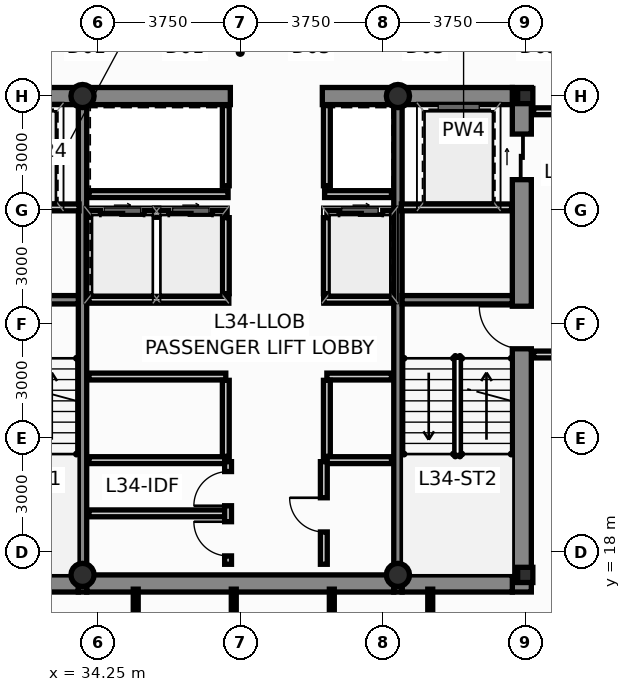
"""IFC4 building model, lengths in metres.
Left out: names, types, materials, properties, quantities, classifications, styles, units other than length and angle.
Written with IfcOpenShell. Run it as: python <this file> out.ifc"""

import sys

from ifc_helpers import new_model, si_unit, direction, frame, frame_2d, origin, origin_2d, place, context, subcontext, project, spatial, rectangle, hollow_circle, i_section, extrude, source, transform, mapped, element, fill, save


model = new_model("IFC4")
c1 = context("Model", 3, precision=1e-05, world=origin(), true_north=direction((0.0, 1.0)))
c2 = subcontext(c1, "Body", "Model", "MODEL_VIEW")
j1 = project(units=[si_unit("LENGTHUNIT", "METRE"), si_unit("PLANEANGLEUNIT", "RADIAN")], contexts=[c1])
p1 = place(None, origin())
s1 = spatial("IfcSite", under=j1, at=p1, CompositionType="ELEMENT")
p2 = place(p1, origin())
s2 = spatial("IfcBuilding", under=s1, at=p2, CompositionType="ELEMENT")
p3 = place(p2, frame((0.0, 0.0, 131.8)))
s3 = spatial("IfcBuildingStorey", under=s2, at=p3, CompositionType="ELEMENT", Elevation=131.8)
m1 = source(origin(), c2, "Body", "SweptSolid", [
    extrude(i_section(OverallWidth=0.4, OverallDepth=0.4, WebThickness=0.02, FlangeThickness=0.032, at=origin_2d()), origin(), (0.0, 0.0, 1.0), 3.65),
])
for number, where, z_axis, x_axis in (
    (1, (45.5, 17.4, 0.0), (0.0, 0.0, 1.0), (1.0, 0.0, 0.0)),
    (2, (45.5, 30.0, 0.0), (0.0, 0.0, 1.0), (1.0, 0.0, 0.0)),
):
    element("IfcColumn", number, at=place(p3, frame(where, z_axis=z_axis, x_axis=x_axis)), inside=s3, PredefinedType="COLUMN", context=c2, shape_type="MappedRepresentation", body=[
        mapped(m1, transform((0.0, 0.0, 0.0), scale=1.0)),
    ])
m2 = source(origin(), c2, "Body", "SweptSolid", [
    extrude(hollow_circle(Radius=0.305, WallThickness=0.025, at=origin_2d()), origin(), (0.0, 0.0, 1.0), 3.65),
])
for number, where, z_axis, x_axis in (
    (3, (33.85, 17.4, 0.0), (0.0, 0.0, 1.0), (1.0, 0.0, 0.0)),
    (4, (42.15, 17.4, 0.0), (0.0, 0.0, 1.0), (1.0, 0.0, 0.0)),
    (5, (33.85, 30.0, 0.0), (0.0, 0.0, 1.0), (1.0, 0.0, 0.0)),
    (6, (42.15, 30.0, 0.0), (0.0, 0.0, 1.0), (1.0, 0.0, 0.0)),
):
    element("IfcColumn", number, at=place(p3, frame(where, z_axis=z_axis, x_axis=x_axis)), inside=s3, PredefinedType="COLUMN", context=c2, shape_type="MappedRepresentation", body=[
        mapped(m2, transform((0.0, 0.0, 0.0), scale=1.0)),
    ])
p4 = place(p3, frame((45.41, 16.95, 0.0), z_axis=(0.0, 0.0, 1.0), x_axis=(0.0, 1.0, 0.0)))
e7 = element("IfcWall", 7, at=p4, inside=s3, PredefinedType="SHEAR", context=c2, shape_type="SweptSolid", body=[
    extrude(rectangle(XDim=13.275, YDim=0.5, at=frame_2d((6.638, 0.0))), origin(), (0.0, 0.0, 1.0), 3.65),
])
p5 = place(p4, frame((6.4, 0.0, 0.0)))
e8 = element("IfcOpeningElement", 8, at=p5, cuts=e7, PredefinedType="OPENING", context=c2, shape_type="SweptSolid", body=[
    extrude(rectangle(XDim=1.12, YDim=2.15, at=frame_2d((0.56, 1.075))), frame((0.0, 0.262, 0.0), z_axis=(0.0, -1.0, 0.0), x_axis=(1.0, 0.0, 0.0)), (0.0, 0.0, 1.0), 0.524),
])
p6 = place(p4, frame((10.85, 0.0, 0.0)))
e9 = element("IfcOpeningElement", 9, at=p6, cuts=e7, PredefinedType="OPENING", context=c2, shape_type="SweptSolid", body=[
    extrude(rectangle(XDim=1.2, YDim=2.2, at=frame_2d((0.6, 1.1))), frame((0.0, 0.262, 0.0), z_axis=(0.0, -1.0, 0.0), x_axis=(1.0, 0.0, 0.0)), (0.0, 0.0, 1.0), 0.524),
])
p7 = place(p3, frame((30.84, 17.175, 0.0), z_axis=(0.0, 0.0, 1.0), x_axis=(1.0, 0.0, 0.0)))
e10 = element("IfcWall", 10, at=p7, inside=s3, PredefinedType="SHEAR", context=c2, shape_type="SweptSolid", body=[
    extrude(rectangle(XDim=2.9, YDim=0.45, at=frame_2d((1.45, 0.0))), origin(), (0.0, 0.0, 1.0), 3.65),
])
p8 = place(p3, frame((33.96, 17.175, 0.0), z_axis=(0.0, 0.0, 1.0), x_axis=(1.0, 0.0, 0.0)))
e11 = element("IfcWall", 11, at=p8, inside=s3, PredefinedType="SHEAR", context=c2, shape_type="SweptSolid", body=[
    extrude(rectangle(XDim=8.08, YDim=0.45, at=frame_2d((4.04, 0.0))), origin(), (0.0, 0.0, 1.0), 3.65),
])
for number, where, z_axis, x_axis in (
    (12, (42.26, 17.175, 0.0), (0.0, 0.0, 1.0), (1.0, 0.0, 0.0)),
    (13, (30.84, 30.0, 0.0), (0.0, 0.0, 1.0), (1.0, 0.0, 0.0)),
):
    element("IfcWall", number, at=place(p3, frame(where, z_axis=z_axis, x_axis=x_axis)), inside=s3, PredefinedType="SHEAR", context=c2, shape_type="SweptSolid", body=[
        extrude(rectangle(XDim=2.9, YDim=0.45, at=frame_2d((1.45, 0.0))), origin(), (0.0, 0.0, 1.0), 3.65),
    ])
p9 = place(p3, frame((33.96, 30.0, 0.0), z_axis=(0.0, 0.0, 1.0), x_axis=(1.0, 0.0, 0.0)))
e14 = element("IfcWall", 14, at=p9, inside=s3, PredefinedType="SHEAR", context=c2, shape_type="SweptSolid", body=[
    extrude(rectangle(XDim=3.78, YDim=0.45, at=frame_2d((1.89, 0.0))), origin(), (0.0, 0.0, 1.0), 3.65),
])
p10 = place(p3, frame((40.16, 30.0, 0.0), z_axis=(0.0, 0.0, 1.0), x_axis=(1.0, 0.0, 0.0)))
e15 = element("IfcWall", 15, at=p10, inside=s3, PredefinedType="SHEAR", context=c2, shape_type="SweptSolid", body=[
    extrude(rectangle(XDim=1.88, YDim=0.45, at=frame_2d((0.94, 0.0))), origin(), (0.0, 0.0, 1.0), 3.65),
])
p11 = place(p3, frame((42.26, 30.0, 0.0), z_axis=(0.0, 0.0, 1.0), x_axis=(1.0, 0.0, 0.0)))
e16 = element("IfcWall", 16, at=p11, inside=s3, PredefinedType="SHEAR", context=c2, shape_type="SweptSolid", body=[
    extrude(rectangle(XDim=2.9, YDim=0.45, at=frame_2d((1.45, 0.0))), origin(), (0.0, 0.0, 1.0), 3.65),
])
for number, where, z_axis, x_axis in (
    (17, (33.85, 16.95, 0.0), (0.0, 0.0, 1.0), (0.0, 1.0, 0.0)),
    (18, (42.15, 16.95, 0.0), (0.0, 0.0, 1.0), (0.0, 1.0, 0.0)),
):
    element("IfcWall", number, at=place(p3, frame(where, z_axis=z_axis, x_axis=x_axis)), inside=s3, PredefinedType="SHEAR", context=c2, shape_type="SweptSolid", body=[
        extrude(rectangle(XDim=13.275, YDim=0.22, at=frame_2d((6.638, 0.0))), origin(), (0.0, 0.0, 1.0), 3.65),
    ])
for number, where, z_axis, x_axis in (
    (19, (30.84, 24.64, 0.0), (0.0, 0.0, 1.0), (1.0, 0.0, 0.0)),
    (20, (42.26, 24.64, 0.0), (0.0, 0.0, 1.0), (1.0, 0.0, 0.0)),
):
    element("IfcWall", number, at=place(p3, frame(where, z_axis=z_axis, x_axis=x_axis)), inside=s3, PredefinedType="SHEAR", context=c2, shape_type="SweptSolid", body=[
        extrude(rectangle(XDim=2.9, YDim=0.22, at=frame_2d((1.45, 0.0))), origin(), (0.0, 0.0, 1.0), 3.65),
    ])
p12 = place(p3, frame((34.02, 22.62, 0.0), z_axis=(0.0, 0.0, 1.0), x_axis=(1.0, 0.0, 0.0)))
e21 = element("IfcWall", 21, at=p12, inside=s3, PredefinedType="PARTITIONING", context=c2, shape_type="SweptSolid", body=[
    extrude(rectangle(XDim=3.6, YDim=0.18, at=frame_2d((1.8, 0.0))), origin(), (0.0, 0.0, 1.0), 3.4),
])
p13 = place(p3, frame((40.28, 22.62, 0.0), z_axis=(0.0, 0.0, 1.0), x_axis=(1.0, 0.0, 0.0)))
e22 = element("IfcWall", 22, at=p13, inside=s3, PredefinedType="PARTITIONING", context=c2, shape_type="SweptSolid", body=[
    extrude(rectangle(XDim=1.7, YDim=0.18, at=frame_2d((0.85, 0.0))), origin(), (0.0, 0.0, 1.0), 3.4),
])
for number, where, z_axis, x_axis in (
    (23, (37.62, 20.52, 0.0), (0.0, 0.0, 1.0), (0.0, 1.0, 0.0)),
    (24, (40.28, 20.52, 0.0), (0.0, 0.0, 1.0), (0.0, 1.0, 0.0)),
):
    element("IfcWall", number, at=place(p3, frame(where, z_axis=z_axis, x_axis=x_axis)), inside=s3, PredefinedType="PARTITIONING", context=c2, shape_type="SweptSolid", body=[
        extrude(rectangle(XDim=2.0, YDim=0.18, at=frame_2d((1.0, 0.0))), origin(), (0.0, 0.0, 1.0), 3.4),
    ])
p14 = place(p3, frame((34.02, 26.9, 0.0), z_axis=(0.0, 0.0, 1.0), x_axis=(1.0, 0.0, 0.0)))
e25 = element("IfcWall", 25, at=p14, inside=s3, PredefinedType="PARTITIONING", context=c2, shape_type="SweptSolid", body=[
    extrude(rectangle(XDim=3.6, YDim=0.18, at=frame_2d((1.8, 0.0))), origin(), (0.0, 0.0, 1.0), 3.4),
])
p15 = place(p14, frame((0.3, 0.0, 0.0)))
e26 = element("IfcOpeningElement", 26, at=p15, cuts=e25, PredefinedType="OPENING", context=c2, shape_type="SweptSolid", body=[
    extrude(rectangle(XDim=1.15, YDim=2.2, at=frame_2d((0.575, 1.1))), frame((0.0, 0.102, 0.0), z_axis=(0.0, -1.0, 0.0), x_axis=(1.0, 0.0, 0.0)), (0.0, 0.0, 1.0), 0.204),
])
p16 = place(p14, frame((2.1, 0.0, 0.0)))
e27 = element("IfcOpeningElement", 27, at=p16, cuts=e25, PredefinedType="OPENING", context=c2, shape_type="SweptSolid", body=[
    extrude(rectangle(XDim=1.15, YDim=2.2, at=frame_2d((0.575, 1.1))), frame((0.0, 0.102, 0.0), z_axis=(0.0, -1.0, 0.0), x_axis=(1.0, 0.0, 0.0)), (0.0, 0.0, 1.0), 0.204),
])
p17 = place(p3, frame((40.28, 26.9, 0.0), z_axis=(0.0, 0.0, 1.0), x_axis=(1.0, 0.0, 0.0)))
e28 = element("IfcWall", 28, at=p17, inside=s3, PredefinedType="PARTITIONING", context=c2, shape_type="SweptSolid", body=[
    extrude(rectangle(XDim=1.7, YDim=0.18, at=frame_2d((0.85, 0.0))), origin(), (0.0, 0.0, 1.0), 3.4),
])
p18 = place(p17, frame((0.32, 0.0, 0.0)))
e29 = element("IfcOpeningElement", 29, at=p18, cuts=e28, PredefinedType="OPENING", context=c2, shape_type="SweptSolid", body=[
    extrude(rectangle(XDim=1.15, YDim=2.2, at=frame_2d((0.575, 1.1))), frame((0.0, 0.102, 0.0), z_axis=(0.0, -1.0, 0.0), x_axis=(1.0, 0.0, 0.0)), (0.0, 0.0, 1.0), 0.204),
])
for number, where, z_axis, x_axis in (
    (30, (37.62, 24.8, 0.0), (0.0, 0.0, 1.0), (0.0, 1.0, 0.0)),
    (31, (40.28, 24.8, 0.0), (0.0, 0.0, 1.0), (0.0, 1.0, 0.0)),
):
    element("IfcWall", number, at=place(p3, frame(where, z_axis=z_axis, x_axis=x_axis)), inside=s3, PredefinedType="PARTITIONING", context=c2, shape_type="SweptSolid", body=[
        extrude(rectangle(XDim=2.0, YDim=0.18, at=frame_2d((1.0, 0.0))), origin(), (0.0, 0.0, 1.0), 3.4),
    ])
p19 = place(p3, frame((34.02, 24.64, 0.0), z_axis=(0.0, 0.0, 1.0), x_axis=(1.0, 0.0, 0.0)))
e32 = element("IfcWall", 32, at=p19, inside=s3, PredefinedType="PARTITIONING", context=c2, shape_type="SweptSolid", body=[
    extrude(rectangle(XDim=3.68, YDim=0.18, at=frame_2d((1.84, 0.0))), origin(), (0.0, 0.0, 1.0), 3.4),
])
p20 = place(p3, frame((40.2, 24.64, 0.0), z_axis=(0.0, 0.0, 1.0), x_axis=(1.0, 0.0, 0.0)))
e33 = element("IfcWall", 33, at=p20, inside=s3, PredefinedType="PARTITIONING", context=c2, shape_type="SweptSolid", body=[
    extrude(rectangle(XDim=1.78, YDim=0.18, at=frame_2d((0.89, 0.0))), origin(), (0.0, 0.0, 1.0), 3.4),
])
p21 = place(p3, frame((34.02, 27.42, 0.0), z_axis=(0.0, 0.0, 1.0), x_axis=(1.0, 0.0, 0.0)))
e34 = element("IfcWall", 34, at=p21, inside=s3, PredefinedType="PARTITIONING", context=c2, shape_type="SweptSolid", body=[
    extrude(rectangle(XDim=3.66, YDim=0.18, at=frame_2d((1.83, 0.0))), origin(), (0.0, 0.0, 1.0), 3.4),
])
p22 = place(p3, frame((40.22, 27.42, 0.0), z_axis=(0.0, 0.0, 1.0), x_axis=(1.0, 0.0, 0.0)))
e35 = element("IfcWall", 35, at=p22, inside=s3, PredefinedType="PARTITIONING", context=c2, shape_type="SweptSolid", body=[
    extrude(rectangle(XDim=1.76, YDim=0.18, at=frame_2d((0.88, 0.0))), origin(), (0.0, 0.0, 1.0), 3.4),
])
for number, where, z_axis, x_axis in (
    (36, (37.62, 27.64, 0.0), (0.0, 0.0, 1.0), (0.0, 1.0, 0.0)),
    (37, (40.28, 27.64, 0.0), (0.0, 0.0, 1.0), (0.0, 1.0, 0.0)),
):
    element("IfcWall", number, at=place(p3, frame(where, z_axis=z_axis, x_axis=x_axis)), inside=s3, PredefinedType="PARTITIONING", context=c2, shape_type="SweptSolid", body=[
        extrude(rectangle(XDim=2.11, YDim=0.18, at=frame_2d((1.055, 0.0))), origin(), (0.0, 0.0, 1.0), 3.4),
    ])
p23 = place(p3, frame((45.72, 23.2, 0.0), z_axis=(0.0, 0.0, 1.0), x_axis=(1.0, 0.0, 0.0)))
e38 = element("IfcWall", 38, at=p23, inside=s3, PredefinedType="PARTITIONING", context=c2, shape_type="SweptSolid", body=[
    extrude(rectangle(XDim=2.76, YDim=0.18, at=frame_2d((1.38, 0.0))), origin(), (0.0, 0.0, 1.0), 3.4),
])
p24 = place(p3, frame((45.72, 29.6, 0.0), z_axis=(0.0, 0.0, 1.0), x_axis=(1.0, 0.0, 0.0)))
e39 = element("IfcWall", 39, at=p24, inside=s3, PredefinedType="PARTITIONING", context=c2, shape_type="SweptSolid", body=[
    extrude(rectangle(XDim=2.76, YDim=0.18, at=frame_2d((1.38, 0.0))), origin(), (0.0, 0.0, 1.0), 2.925),
])
for number, where, z_axis, x_axis in (
    (40, (30.86, 27.07, 0.0), (0.0, 0.0, 1.0), (1.0, 0.0, 0.0)),
    (41, (42.24, 27.07, 0.0), (0.0, 0.0, 1.0), (1.0, 0.0, 0.0)),
):
    element("IfcWall", number, at=place(p3, frame(where, z_axis=z_axis, x_axis=x_axis)), inside=s3, PredefinedType="PARTITIONING", context=c2, shape_type="SweptSolid", body=[
        extrude(rectangle(XDim=2.9, YDim=0.18, at=frame_2d((1.45, 0.0))), origin(), (0.0, 0.0, 1.0), 3.4),
    ])
p25 = place(p3, frame((34.02, 20.42, 0.0), z_axis=(0.0, 0.0, 1.0), x_axis=(1.0, 0.0, 0.0)))
e42 = element("IfcWall", 42, at=p25, inside=s3, PredefinedType="PARTITIONING", context=c2, shape_type="SweptSolid", body=[
    extrude(rectangle(XDim=3.64, YDim=0.18, at=frame_2d((1.82, 0.0))), origin(), (0.0, 0.0, 1.0), 3.4),
])
p26 = place(p3, frame((40.22, 20.42, 0.0), z_axis=(0.0, 0.0, 1.0), x_axis=(1.0, 0.0, 0.0)))
e43 = element("IfcWall", 43, at=p26, inside=s3, PredefinedType="PARTITIONING", context=c2, shape_type="SweptSolid", body=[
    extrude(rectangle(XDim=1.76, YDim=0.18, at=frame_2d((0.88, 0.0))), origin(), (0.0, 0.0, 1.0), 3.4),
])
p27 = place(p3, frame((34.02, 19.02, 0.0), z_axis=(0.0, 0.0, 1.0), x_axis=(1.0, 0.0, 0.0)))
e44 = element("IfcWall", 44, at=p27, inside=s3, PredefinedType="PARTITIONING", context=c2, shape_type="SweptSolid", body=[
    extrude(rectangle(XDim=3.58, YDim=0.18, at=frame_2d((1.79, 0.0))), origin(), (0.0, 0.0, 1.0), 3.4),
])
p28 = place(p3, frame((37.68, 17.68, 0.0), z_axis=(0.0, 0.0, 1.0), x_axis=(0.0, 1.0, 0.0)))
e45 = element("IfcWall", 45, at=p28, inside=s3, PredefinedType="PARTITIONING", context=c2, shape_type="SweptSolid", body=[
    extrude(rectangle(XDim=2.7, YDim=0.18, at=frame_2d((1.35, 0.0))), origin(), (0.0, 0.0, 1.0), 3.4),
])
p29 = place(p28, frame((0.22, 0.0, 0.0)))
e46 = element("IfcOpeningElement", 46, at=p29, cuts=e45, PredefinedType="OPENING", context=c2, shape_type="SweptSolid", body=[
    extrude(rectangle(XDim=0.9, YDim=2.1, at=frame_2d((0.45, 1.05))), frame((0.0, 0.102, 0.0), z_axis=(0.0, -1.0, 0.0), x_axis=(1.0, 0.0, 0.0)), (0.0, 0.0, 1.0), 0.204),
])
p30 = place(p28, frame((1.54, 0.0, 0.0)))
e47 = element("IfcOpeningElement", 47, at=p30, cuts=e45, PredefinedType="OPENING", context=c2, shape_type="SweptSolid", body=[
    extrude(rectangle(XDim=0.9, YDim=2.1, at=frame_2d((0.45, 1.05))), frame((0.0, 0.102, 0.0), z_axis=(0.0, -1.0, 0.0), x_axis=(1.0, 0.0, 0.0)), (0.0, 0.0, 1.0), 0.204),
])
p31 = place(p3, frame((40.2, 17.68, 0.0), z_axis=(0.0, 0.0, 1.0), x_axis=(0.0, 1.0, 0.0)))
e48 = element("IfcWall", 48, at=p31, inside=s3, PredefinedType="PARTITIONING", context=c2, shape_type="SweptSolid", body=[
    extrude(rectangle(XDim=2.7, YDim=0.18, at=frame_2d((1.35, 0.0))), origin(), (0.0, 0.0, 1.0), 3.4),
])
p32 = place(p31, frame((0.85, 0.0, 0.0)))
e49 = element("IfcOpeningElement", 49, at=p32, cuts=e48, PredefinedType="OPENING", context=c2, shape_type="SweptSolid", body=[
    extrude(rectangle(XDim=0.9, YDim=2.1, at=frame_2d((0.45, 1.05))), frame((0.0, 0.102, 0.0), z_axis=(0.0, -1.0, 0.0), x_axis=(1.0, 0.0, 0.0)), (0.0, 0.0, 1.0), 0.204),
])
p33 = place(p3, frame((35.25, 5.891, 0.0), z_axis=(0.0, 0.0, 1.0), x_axis=(0.0, 1.0, 0.0)))
e50 = element("IfcWall", 50, at=p33, inside=s3, PredefinedType="PARTITIONING", context=c2, shape_type="SweptSolid", body=[
    extrude(rectangle(XDim=11.134, YDim=0.13, at=frame_2d((5.567, 0.0))), origin(), (0.0, 0.0, 1.0), 3.4),
])
p34 = place(p33, frame((5.132, 0.0, 0.0)))
e51 = element("IfcOpeningElement", 51, at=p34, cuts=e50, PredefinedType="OPENING", context=c2, shape_type="SweptSolid", body=[
    extrude(rectangle(XDim=0.96, YDim=2.15, at=frame_2d((0.48, 1.075))), frame((0.0, 0.077, 0.0), z_axis=(0.0, -1.0, 0.0), x_axis=(1.0, 0.0, 0.0)), (0.0, 0.0, 1.0), 0.154),
])
p35 = place(p3, frame((37.83, 5.924, 0.0), z_axis=(0.0, 0.0, 1.0), x_axis=(0.0, 1.0, 0.0)))
e52 = element("IfcWall", 52, at=p35, inside=s3, PredefinedType="PARTITIONING", context=c2, shape_type="SweptSolid", body=[
    extrude(rectangle(XDim=11.101, YDim=0.13, at=frame_2d((5.551, 0.0))), origin(), (0.0, 0.0, 1.0), 3.4),
])
p36 = place(p35, frame((5.117, 0.0, 0.0)))
e53 = element("IfcOpeningElement", 53, at=p36, cuts=e52, PredefinedType="OPENING", context=c2, shape_type="SweptSolid", body=[
    extrude(rectangle(XDim=0.96, YDim=2.15, at=frame_2d((0.48, 1.075))), frame((0.0, 0.077, 0.0), z_axis=(0.0, -1.0, 0.0), x_axis=(1.0, 0.0, 0.0)), (0.0, 0.0, 1.0), 0.154),
])
p37 = place(p3, frame((40.41, 5.956, 0.0), z_axis=(0.0, 0.0, 1.0), x_axis=(0.0, 1.0, 0.0)))
e54 = element("IfcWall", 54, at=p37, inside=s3, PredefinedType="PARTITIONING", context=c2, shape_type="SweptSolid", body=[
    extrude(rectangle(XDim=11.069, YDim=0.13, at=frame_2d((5.534, 0.0))), origin(), (0.0, 0.0, 1.0), 3.4),
])
p38 = place(p37, frame((5.102, 0.0, 0.0)))
e55 = element("IfcOpeningElement", 55, at=p38, cuts=e54, PredefinedType="OPENING", context=c2, shape_type="SweptSolid", body=[
    extrude(rectangle(XDim=0.96, YDim=2.15, at=frame_2d((0.48, 1.075))), frame((0.0, 0.077, 0.0), z_axis=(0.0, -1.0, 0.0), x_axis=(1.0, 0.0, 0.0)), (0.0, 0.0, 1.0), 0.154),
])
p39 = place(p3, frame((43.0, 5.989, 0.0), z_axis=(0.0, 0.0, 1.0), x_axis=(0.0, 1.0, 0.0)))
e56 = element("IfcWall", 56, at=p39, inside=s3, PredefinedType="PARTITIONING", context=c2, shape_type="SweptSolid", body=[
    extrude(rectangle(XDim=11.036, YDim=0.13, at=frame_2d((5.518, 0.0))), origin(), (0.0, 0.0, 1.0), 2.925),
])
p40 = place(p39, frame((5.087, 0.0, 0.0)))
e57 = element("IfcOpeningElement", 57, at=p40, cuts=e56, PredefinedType="OPENING", context=c2, shape_type="SweptSolid", body=[
    extrude(rectangle(XDim=0.96, YDim=2.15, at=frame_2d((0.48, 1.075))), frame((0.0, 0.077, 0.0), z_axis=(0.0, -1.0, 0.0), x_axis=(1.0, 0.0, 0.0)), (0.0, 0.0, 1.0), 0.154),
])
p41 = place(p5, origin())
e58 = element("IfcDoor", 58, at=p41, inside=s3, OperationType="SINGLE_SWING_RIGHT", PredefinedType="DOOR", context=c2, shape_type="SweptSolid", body=[
    extrude(rectangle(XDim=1.12, YDim=2.15, at=frame_2d((0.56, 1.075))), frame((0.0, 0.025, 0.0), z_axis=(0.0, -1.0, 0.0), x_axis=(1.0, 0.0, 0.0)), (0.0, 0.0, 1.0), 0.05),
])
fill(e8, e58)
p42 = place(p6, origin())
e59 = element("IfcDoor", 59, at=p42, inside=s3, OperationType="SLIDING_TO_RIGHT", PredefinedType="DOOR", context=c2, shape_type="SweptSolid", body=[
    extrude(rectangle(XDim=1.2, YDim=2.2, at=frame_2d((0.6, 1.1))), frame((0.0, 0.025, 0.0), z_axis=(0.0, -1.0, 0.0), x_axis=(1.0, 0.0, 0.0)), (0.0, 0.0, 1.0), 0.05),
])
fill(e9, e59)
p43 = place(p15, origin())
e60 = element("IfcDoor", 60, at=p43, inside=s3, OperationType="SLIDING_TO_LEFT", PredefinedType="DOOR", context=c2, shape_type="SweptSolid", body=[
    extrude(rectangle(XDim=1.15, YDim=2.2, at=frame_2d((0.575, 1.1))), frame((0.0, 0.025, 0.0), z_axis=(0.0, -1.0, 0.0), x_axis=(1.0, 0.0, 0.0)), (0.0, 0.0, 1.0), 0.05),
])
fill(e26, e60)
p44 = place(p16, origin())
e61 = element("IfcDoor", 61, at=p44, inside=s3, OperationType="SLIDING_TO_RIGHT", PredefinedType="DOOR", context=c2, shape_type="SweptSolid", body=[
    extrude(rectangle(XDim=1.15, YDim=2.2, at=frame_2d((0.575, 1.1))), frame((0.0, 0.025, 0.0), z_axis=(0.0, -1.0, 0.0), x_axis=(1.0, 0.0, 0.0)), (0.0, 0.0, 1.0), 0.05),
])
fill(e27, e61)
p45 = place(p18, origin())
e62 = element("IfcDoor", 62, at=p45, inside=s3, OperationType="SLIDING_TO_LEFT", PredefinedType="DOOR", context=c2, shape_type="SweptSolid", body=[
    extrude(rectangle(XDim=1.15, YDim=2.2, at=frame_2d((0.575, 1.1))), frame((0.0, 0.025, 0.0), z_axis=(0.0, -1.0, 0.0), x_axis=(1.0, 0.0, 0.0)), (0.0, 0.0, 1.0), 0.05),
])
fill(e29, e62)
p46 = place(p29, origin())
e63 = element("IfcDoor", 63, at=p46, inside=s3, OperationType="SINGLE_SWING_RIGHT", PredefinedType="DOOR", context=c2, shape_type="SweptSolid", body=[
    extrude(rectangle(XDim=0.9, YDim=2.1, at=frame_2d((0.45, 1.05))), frame((0.0, 0.025, 0.0), z_axis=(0.0, -1.0, 0.0), x_axis=(1.0, 0.0, 0.0)), (0.0, 0.0, 1.0), 0.05),
])
fill(e46, e63)
p47 = place(p30, origin())
e64 = element("IfcDoor", 64, at=p47, inside=s3, OperationType="SINGLE_SWING_LEFT", PredefinedType="DOOR", context=c2, shape_type="SweptSolid", body=[
    extrude(rectangle(XDim=0.9, YDim=2.1, at=frame_2d((0.45, 1.05))), frame((0.0, 0.025, 0.0), z_axis=(0.0, -1.0, 0.0), x_axis=(1.0, 0.0, 0.0)), (0.0, 0.0, 1.0), 0.05),
])
fill(e47, e64)
p48 = place(p32, origin())
e65 = element("IfcDoor", 65, at=p48, inside=s3, OperationType="SINGLE_SWING_RIGHT", PredefinedType="DOOR", context=c2, shape_type="SweptSolid", body=[
    extrude(rectangle(XDim=0.9, YDim=2.1, at=frame_2d((0.45, 1.05))), frame((0.0, 0.025, 0.0), z_axis=(0.0, -1.0, 0.0), x_axis=(1.0, 0.0, 0.0)), (0.0, 0.0, 1.0), 0.05),
])
fill(e49, e65)
save(model, sys.argv[1])
